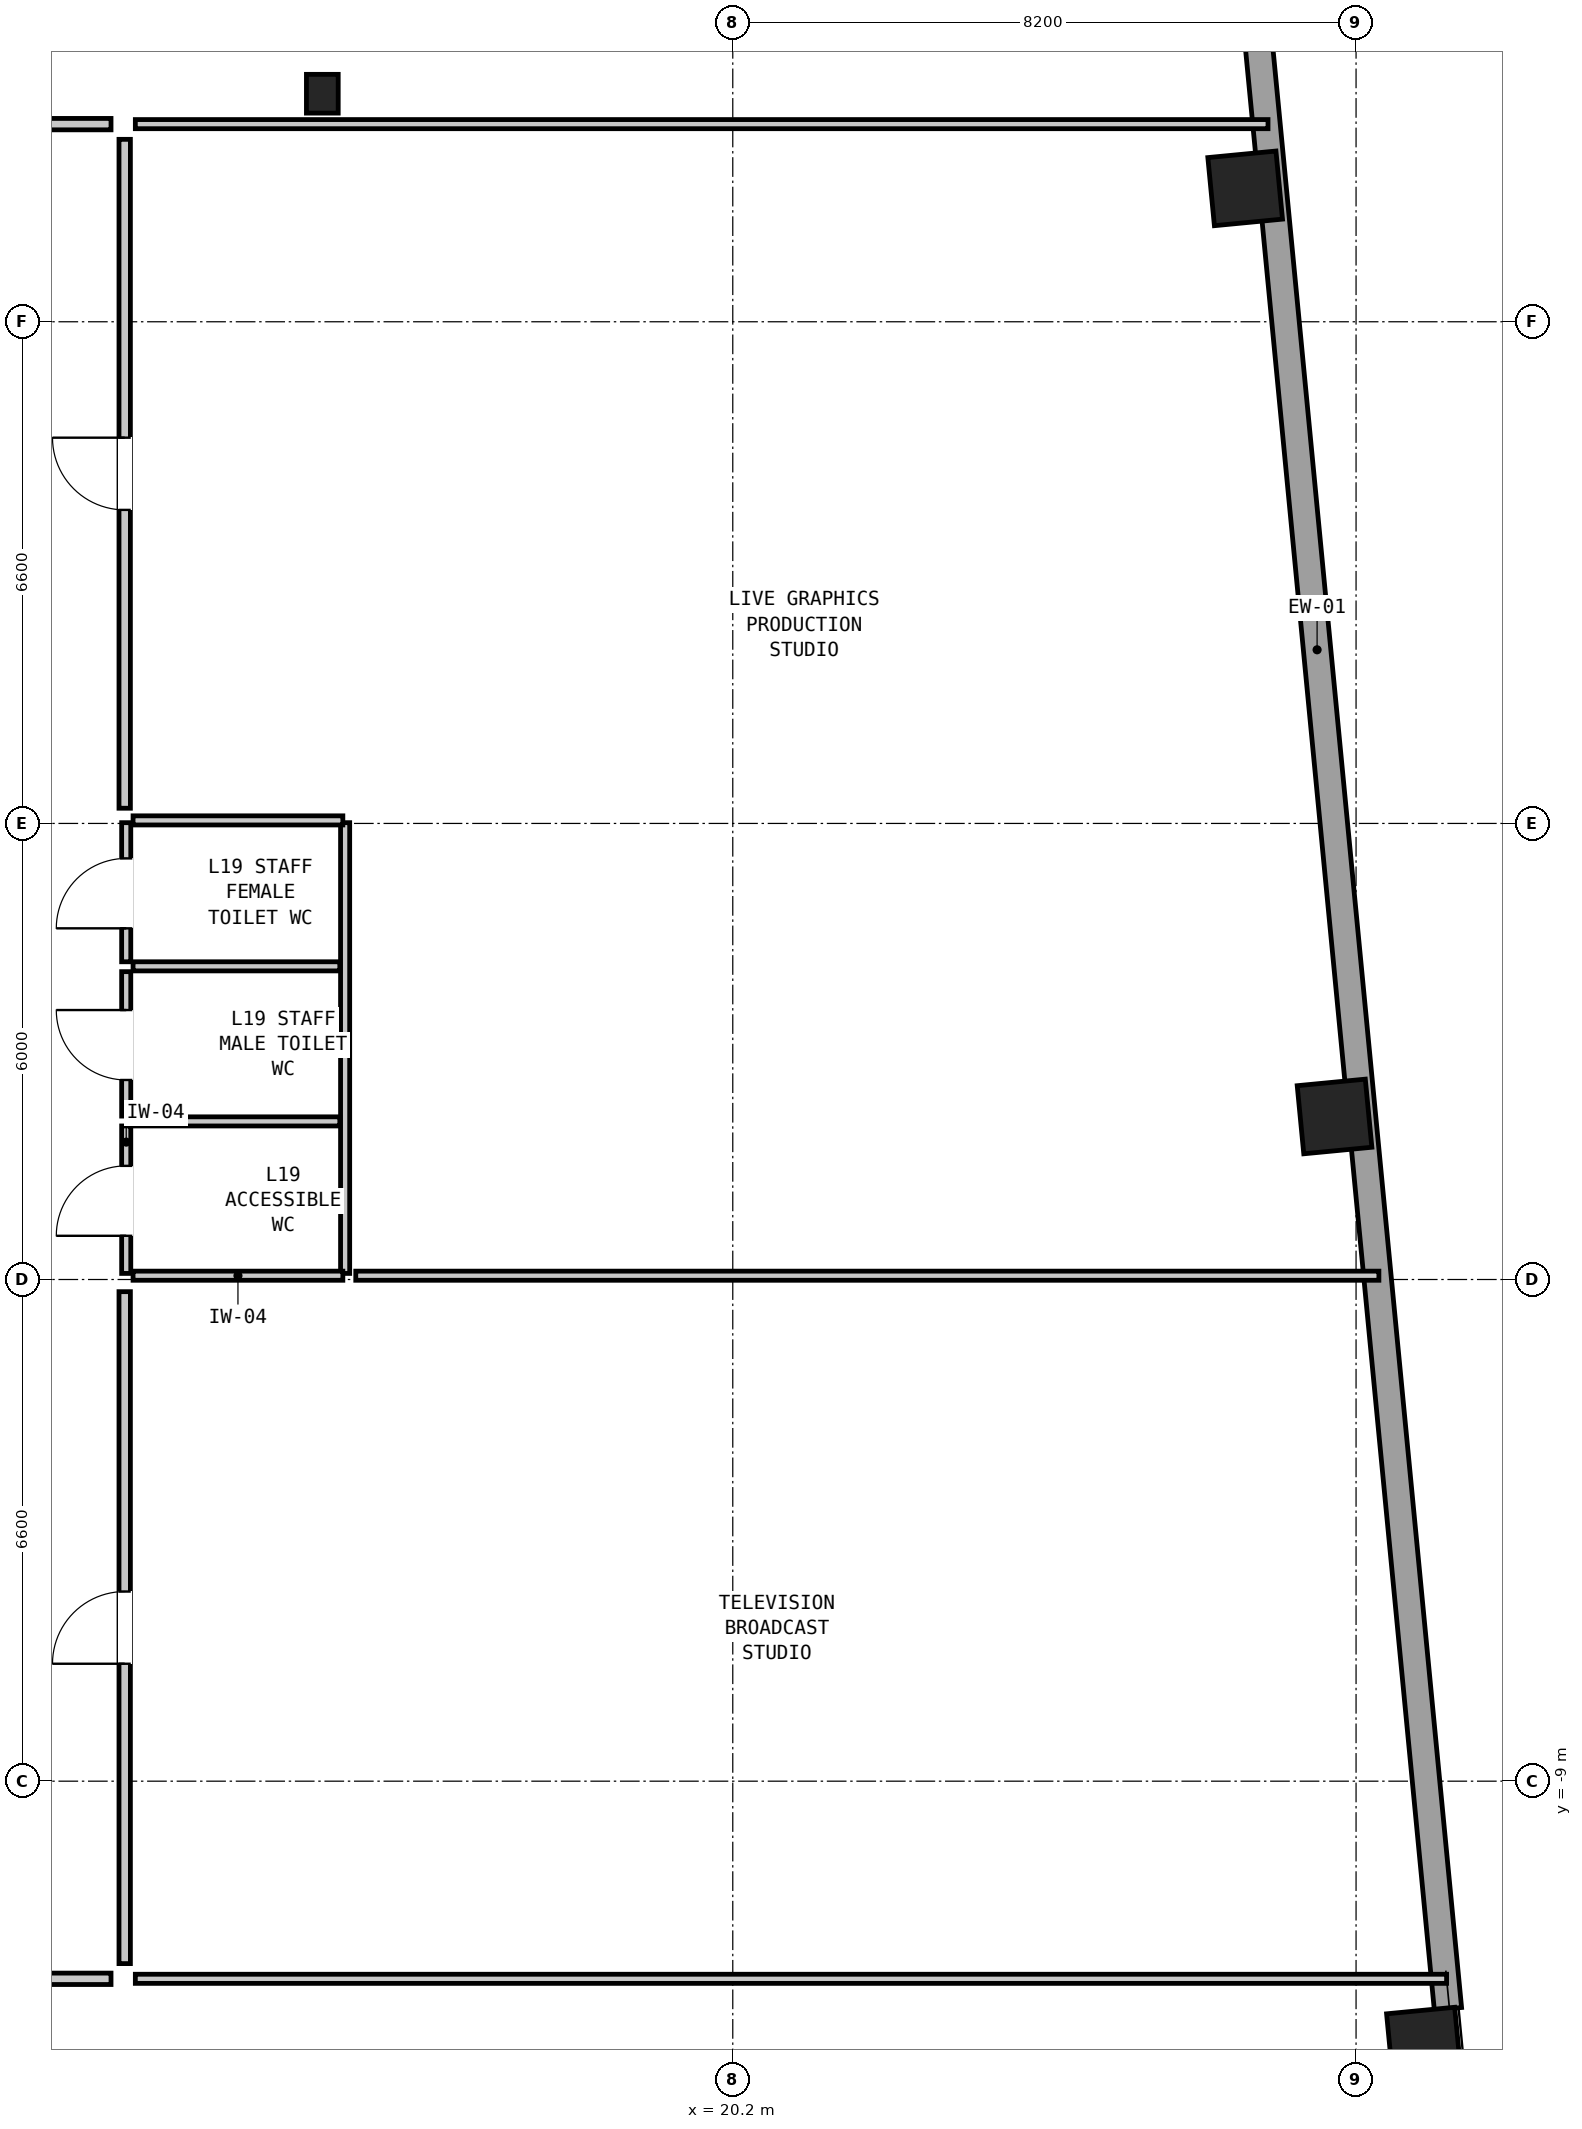
"""IFC4 building model, lengths in metres.
Left out: names, types, materials, properties, quantities, classifications, styles, units other than length and angle.
Written with IfcOpenShell. Run it as: python <this file> out.ifc"""

import sys

from ifc_helpers import new_model, si_unit, direction, frame, frame_2d, origin, origin_2d, place, context, subcontext, project, spatial, rectangle, hollow_rectangle, i_section, extrude, element, fill, save


model = new_model("IFC4")
c1 = context("Model", 3, precision=1e-05, world=origin(), true_north=direction((0.0, 1.0)))
c2 = subcontext(c1, "Body", "Model", "MODEL_VIEW")
j1 = project(units=[si_unit("LENGTHUNIT", "METRE"), si_unit("PLANEANGLEUNIT", "RADIAN")], contexts=[c1])
p1 = place(None, origin())
s1 = spatial("IfcSite", under=j1, at=p1, CompositionType="ELEMENT")
p2 = place(p1, origin())
s2 = spatial("IfcBuilding", under=s1, at=p2, CompositionType="ELEMENT")
p3 = place(p2, frame((0.0, 0.0, 69.45)))
s3 = spatial("IfcBuildingStorey", under=s2, at=p3, CompositionType="ELEMENT", Elevation=69.45)
for number, where, z_axis, x_axis in (
    (1, (29.292, -12.465, 0.0), (0.0, 0.0, 1.0), (-0.096, 0.995, 0.0)),
    (2, (28.117, -0.255, 0.0), (0.0, 0.0, 1.0), (-0.096, 0.995, 0.0)),
    (3, (26.941, 11.955, 0.0), (0.0, 0.0, 1.0), (-0.096, 0.995, 0.0)),
):
    element("IfcColumn", number, at=place(p3, frame(where, z_axis=z_axis, x_axis=x_axis)), inside=s3, PredefinedType="COLUMN", context=c2, shape_type="SweptSolid", body=[
        extrude(hollow_rectangle(XDim=0.9, YDim=0.9, WallThickness=0.055, at=origin_2d()), origin(), (0.0, 0.0, 1.0), 3.05),
    ])
p4 = place(p3, frame((14.8, 13.2, 0.0), z_axis=(0.0, 0.0, 1.0), x_axis=(1.0, 0.0, 0.0)))
e4 = element("IfcColumn", 4, at=p4, inside=s3, PredefinedType="COLUMN", context=c2, shape_type="SweptSolid", body=[
    extrude(i_section(OverallWidth=0.418, OverallDepth=0.51, WebThickness=0.042, FlangeThickness=0.068, at=origin_2d()), origin(), (0.0, 0.0, 1.0), 3.05),
])
p5 = place(p3, frame((26.166, 23.764, 0.0), z_axis=(0.0, 0.0, 1.0), x_axis=(0.095844621123, -0.995396307308, 0.0)))
e5 = element("IfcWall", 5, at=p5, inside=s3, PredefinedType="SOLIDWALL", context=c2, shape_type="SweptSolid", body=[
    extrude(rectangle(XDim=35.924, YDim=0.36, at=frame_2d((17.962, 0.0))), origin(), (0.0, 0.0, 1.0), 0.48),
])
p6 = place(p3, frame((12.22, -2.32, 0.0), z_axis=(0.0, 0.0, 1.0), x_axis=(0.0, 1.0, 0.0)))
e6 = element("IfcWall", 6, at=p6, inside=s3, PredefinedType="PARTITIONING", context=c2, shape_type="SweptSolid", body=[
    extrude(rectangle(XDim=1.94, YDim=0.12, at=frame_2d((0.97, 0.0))), origin(), (0.0, 0.0, 1.0), 2.83),
])
p7 = place(p6, frame((0.495, 0.0, 0.0)))
e7 = element("IfcOpeningElement", 7, at=p7, cuts=e6, PredefinedType="OPENING", context=c2, shape_type="SweptSolid", body=[
    extrude(rectangle(XDim=0.92, YDim=2.1, at=frame_2d((0.46, 1.05))), frame((0.0, 0.072, 0.0), z_axis=(0.0, -1.0, 0.0), x_axis=(1.0, 0.0, 0.0)), (0.0, 0.0, 1.0), 0.144),
])
p8 = place(p3, frame((12.22, -0.25, 0.0), z_axis=(0.0, 0.0, 1.0), x_axis=(0.0, 1.0, 0.0)))
e8 = element("IfcWall", 8, at=p8, inside=s3, PredefinedType="PARTITIONING", context=c2, shape_type="SweptSolid", body=[
    extrude(rectangle(XDim=1.9, YDim=0.12, at=frame_2d((0.95, 0.0))), origin(), (0.0, 0.0, 1.0), 2.83),
])
p9 = place(p8, frame((0.475, 0.0, 0.0)))
e9 = element("IfcOpeningElement", 9, at=p9, cuts=e8, PredefinedType="OPENING", context=c2, shape_type="SweptSolid", body=[
    extrude(rectangle(XDim=0.92, YDim=2.1, at=frame_2d((0.46, 1.05))), frame((0.0, 0.072, 0.0), z_axis=(0.0, -1.0, 0.0), x_axis=(1.0, 0.0, 0.0)), (0.0, 0.0, 1.0), 0.144),
])
p10 = place(p3, frame((12.22, 1.78, 0.0), z_axis=(0.0, 0.0, 1.0), x_axis=(0.0, 1.0, 0.0)))
e10 = element("IfcWall", 10, at=p10, inside=s3, PredefinedType="PARTITIONING", context=c2, shape_type="SweptSolid", body=[
    extrude(rectangle(XDim=1.83, YDim=0.12, at=frame_2d((0.915, 0.0))), origin(), (0.0, 0.0, 1.0), 2.83),
])
p11 = place(p10, frame((0.44, 0.0, 0.0)))
e11 = element("IfcOpeningElement", 11, at=p11, cuts=e10, PredefinedType="OPENING", context=c2, shape_type="SweptSolid", body=[
    extrude(rectangle(XDim=0.92, YDim=2.1, at=frame_2d((0.46, 1.05))), frame((0.0, 0.072, 0.0), z_axis=(0.0, -1.0, 0.0), x_axis=(1.0, 0.0, 0.0)), (0.0, 0.0, 1.0), 0.144),
])
p12 = place(p3, frame((15.1, -2.32, 0.0), z_axis=(0.0, 0.0, 1.0), x_axis=(0.0, 1.0, 0.0)))
e12 = element("IfcWall", 12, at=p12, inside=s3, PredefinedType="PARTITIONING", context=c2, shape_type="SweptSolid", body=[
    extrude(rectangle(XDim=5.93, YDim=0.12, at=frame_2d((2.965, 0.0))), origin(), (0.0, 0.0, 1.0), 2.83),
])
for number, where, z_axis, x_axis in (
    (13, (12.31, -2.35, 0.0), (0.0, 0.0, 1.0), (1.0, 0.0, 0.0)),
    (14, (12.31, 3.64, 0.0), (0.0, 0.0, 1.0), (1.0, 0.0, 0.0)),
):
    element("IfcWall", number, at=place(p3, frame(where, z_axis=z_axis, x_axis=x_axis)), inside=s3, PredefinedType="PARTITIONING", context=c2, shape_type="SweptSolid", body=[
        extrude(rectangle(XDim=2.76, YDim=0.12, at=frame_2d((1.38, 0.0))), origin(), (0.0, 0.0, 1.0), 1.692),
    ])
for number, where, z_axis, x_axis in (
    (15, (12.31, -0.32, 0.0), (0.0, 0.0, 1.0), (1.0, 0.0, 0.0)),
    (16, (12.31, 1.72, 0.0), (0.0, 0.0, 1.0), (1.0, 0.0, 0.0)),
):
    element("IfcWall", number, at=place(p3, frame(where, z_axis=z_axis, x_axis=x_axis)), inside=s3, PredefinedType="PARTITIONING", context=c2, shape_type="SweptSolid", body=[
        extrude(rectangle(XDim=2.72, YDim=0.12, at=frame_2d((1.36, 0.0))), origin(), (0.0, 0.0, 1.0), 2.83),
    ])
p13 = place(p3, frame((12.34, 12.8, 0.0), z_axis=(0.0, 0.0, 1.0), x_axis=(1.0, 0.0, 0.0)))
e17 = element("IfcWall", 17, at=p13, inside=s3, PredefinedType="PARTITIONING", context=c2, shape_type="SweptSolid", body=[
    extrude(rectangle(XDim=14.902, YDim=0.12, at=frame_2d((7.451, 0.0))), origin(), (0.0, 0.0, 1.0), 2.83),
])
p14 = place(p3, frame((12.34, -11.6, 0.0), z_axis=(0.0, 0.0, 1.0), x_axis=(1.0, 0.0, 0.0)))
e18 = element("IfcWall", 18, at=p14, inside=s3, PredefinedType="PARTITIONING", context=c2, shape_type="SweptSolid", body=[
    extrude(rectangle(XDim=17.251, YDim=0.12, at=frame_2d((8.625, 0.0))), origin(), (0.0, 0.0, 1.0), 2.274),
])
p15 = place(p3, frame((15.24, -2.35, 0.0), z_axis=(0.0, 0.0, 1.0), x_axis=(1.0, 0.0, 0.0)))
e19 = element("IfcWall", 19, at=p15, inside=s3, PredefinedType="PARTITIONING", context=c2, shape_type="SweptSolid", body=[
    extrude(rectangle(XDim=13.46, YDim=0.12, at=frame_2d((6.73, 0.0))), origin(), (0.0, 0.0, 1.0), 1.692),
])
p16 = place(p3, frame((-2.72, 12.8, 0.0), z_axis=(0.0, 0.0, 1.0), x_axis=(1.0, 0.0, 0.0)))
e20 = element("IfcWall", 20, at=p16, inside=s3, PredefinedType="PARTITIONING", context=c2, shape_type="SweptSolid", body=[
    extrude(rectangle(XDim=14.74, YDim=0.15, at=frame_2d((7.37, 0.0))), origin(), (0.0, 0.0, 1.0), 2.83),
])
p17 = place(p16, frame((6.895, 0.0, 0.0)))
e21 = element("IfcOpeningElement", 21, at=p17, cuts=e20, PredefinedType="OPENING", context=c2, shape_type="SweptSolid", body=[
    extrude(rectangle(XDim=0.95, YDim=2.1, at=frame_2d((0.475, 1.05))), frame((0.0, 0.087, 0.0), z_axis=(0.0, -1.0, 0.0), x_axis=(1.0, 0.0, 0.0)), (0.0, 0.0, 1.0), 0.174),
])
p18 = place(p3, frame((-12.02, -11.6, 0.0), z_axis=(0.0, 0.0, 1.0), x_axis=(1.0, 0.0, 0.0)))
e22 = element("IfcWall", 22, at=p18, inside=s3, PredefinedType="PARTITIONING", context=c2, shape_type="SweptSolid", body=[
    extrude(rectangle(XDim=24.04, YDim=0.15, at=frame_2d((12.02, 0.0))), origin(), (0.0, 0.0, 1.0), 2.274),
])
p19 = place(p18, frame((11.545, 0.0, 0.0)))
e23 = element("IfcOpeningElement", 23, at=p19, cuts=e22, PredefinedType="OPENING", context=c2, shape_type="SweptSolid", body=[
    extrude(rectangle(XDim=0.95, YDim=2.1, at=frame_2d((0.475, 1.05))), frame((0.0, 0.087, 0.0), z_axis=(0.0, -1.0, 0.0), x_axis=(1.0, 0.0, 0.0)), (0.0, 0.0, 1.0), 0.174),
])
p20 = place(p3, frame((12.2, -11.4, 0.0), z_axis=(0.0, 0.0, 1.0), x_axis=(0.0, 1.0, 0.0)))
e24 = element("IfcWall", 24, at=p20, inside=s3, PredefinedType="PARTITIONING", context=c2, shape_type="SweptSolid", body=[
    extrude(rectangle(XDim=8.84, YDim=0.15, at=frame_2d((4.42, 0.0))), origin(), (0.0, 0.0, 1.0), 2.83),
])
p21 = place(p20, frame((3.945, 0.0, 0.0)))
e25 = element("IfcOpeningElement", 25, at=p21, cuts=e24, PredefinedType="OPENING", context=c2, shape_type="SweptSolid", body=[
    extrude(rectangle(XDim=0.95, YDim=2.1, at=frame_2d((0.475, 1.05))), frame((0.0, 0.087, 0.0), z_axis=(0.0, -1.0, 0.0), x_axis=(1.0, 0.0, 0.0)), (0.0, 0.0, 1.0), 0.174),
])
p22 = place(p3, frame((12.2, 3.8, 0.0), z_axis=(0.0, 0.0, 1.0), x_axis=(0.0, 1.0, 0.0)))
e26 = element("IfcWall", 26, at=p22, inside=s3, PredefinedType="PARTITIONING", context=c2, shape_type="SweptSolid", body=[
    extrude(rectangle(XDim=8.8, YDim=0.15, at=frame_2d((4.4, 0.0))), origin(), (0.0, 0.0, 1.0), 2.83),
])
p23 = place(p22, frame((3.925, 0.0, 0.0)))
e27 = element("IfcOpeningElement", 27, at=p23, cuts=e26, PredefinedType="OPENING", context=c2, shape_type="SweptSolid", body=[
    extrude(rectangle(XDim=0.95, YDim=2.1, at=frame_2d((0.475, 1.05))), frame((0.0, 0.087, 0.0), z_axis=(0.0, -1.0, 0.0), x_axis=(1.0, 0.0, 0.0)), (0.0, 0.0, 1.0), 0.174),
])
p24 = place(p7, origin())
e28 = element("IfcDoor", 28, at=p24, inside=s3, OperationType="SINGLE_SWING_LEFT", PredefinedType="DOOR", context=c2, shape_type="SweptSolid", body=[
    extrude(rectangle(XDim=0.92, YDim=2.1, at=frame_2d((0.46, 1.05))), frame((0.0, 0.025, 0.0), z_axis=(0.0, -1.0, 0.0), x_axis=(1.0, 0.0, 0.0)), (0.0, 0.0, 1.0), 0.05),
])
fill(e7, e28)
p25 = place(p9, origin())
e29 = element("IfcDoor", 29, at=p25, inside=s3, OperationType="SINGLE_SWING_RIGHT", PredefinedType="DOOR", context=c2, shape_type="SweptSolid", body=[
    extrude(rectangle(XDim=0.92, YDim=2.1, at=frame_2d((0.46, 1.05))), frame((0.0, 0.025, 0.0), z_axis=(0.0, -1.0, 0.0), x_axis=(1.0, 0.0, 0.0)), (0.0, 0.0, 1.0), 0.05),
])
fill(e9, e29)
p26 = place(p11, origin())
e30 = element("IfcDoor", 30, at=p26, inside=s3, OperationType="SINGLE_SWING_LEFT", PredefinedType="DOOR", context=c2, shape_type="SweptSolid", body=[
    extrude(rectangle(XDim=0.92, YDim=2.1, at=frame_2d((0.46, 1.05))), frame((0.0, 0.025, 0.0), z_axis=(0.0, -1.0, 0.0), x_axis=(1.0, 0.0, 0.0)), (0.0, 0.0, 1.0), 0.05),
])
fill(e11, e30)
p27 = place(p21, origin())
e31 = element("IfcDoor", 31, at=p27, inside=s3, OperationType="SINGLE_SWING_LEFT", PredefinedType="DOOR", context=c2, shape_type="SweptSolid", body=[
    extrude(rectangle(XDim=0.95, YDim=2.1, at=frame_2d((0.475, 1.05))), frame((0.0, 0.025, 0.0), z_axis=(0.0, -1.0, 0.0), x_axis=(1.0, 0.0, 0.0)), (0.0, 0.0, 1.0), 0.05),
])
fill(e25, e31)
p28 = place(p23, origin())
e32 = element("IfcDoor", 32, at=p28, inside=s3, OperationType="SINGLE_SWING_RIGHT", PredefinedType="DOOR", context=c2, shape_type="SweptSolid", body=[
    extrude(rectangle(XDim=0.95, YDim=2.1, at=frame_2d((0.475, 1.05))), frame((0.0, 0.025, 0.0), z_axis=(0.0, -1.0, 0.0), x_axis=(1.0, 0.0, 0.0)), (0.0, 0.0, 1.0), 0.05),
])
fill(e27, e32)
save(model, sys.argv[1])
